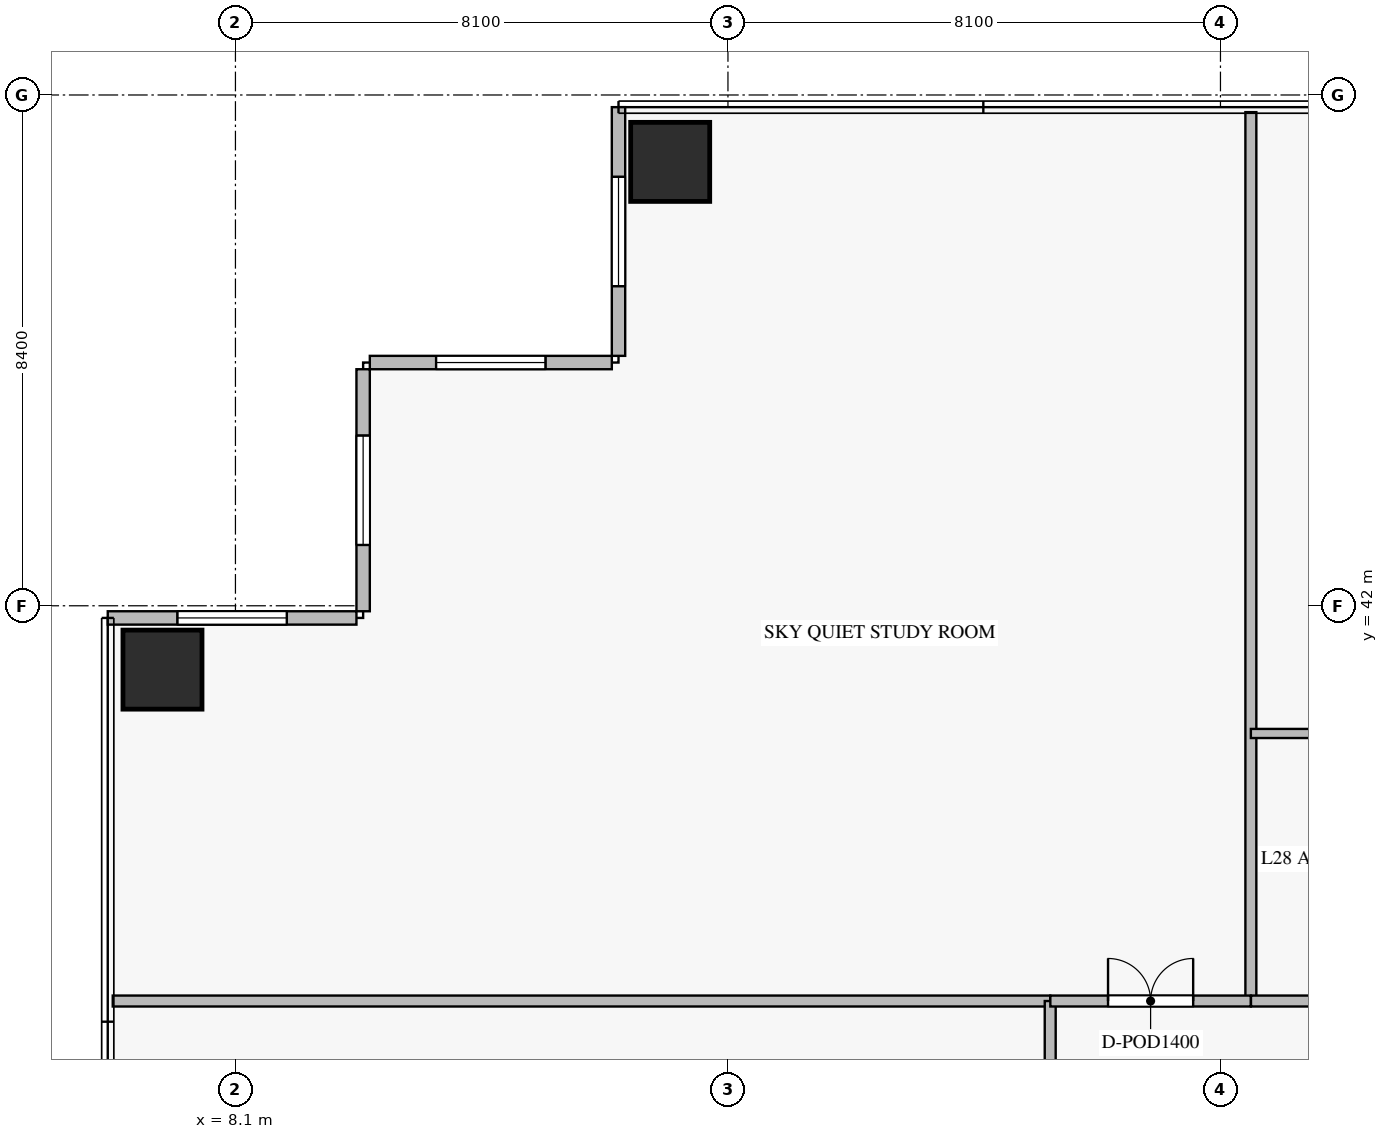
"""IFC4 building model, lengths in metres.
Left out: names, types, materials, properties, quantities, classifications, styles, units other than length and angle.
Written with IfcOpenShell. Run it as: python <this file> out.ifc"""

import sys

from ifc_helpers import new_model, si_unit, direction, frame, frame_2d, origin, origin_2d, place, context, subcontext, project, spatial, rectangle, extrude, source, transform, mapped, element, fill, save


model = new_model("IFC4")
c1 = context("Model", 3, precision=1e-05, world=origin(), true_north=direction((0.0, 1.0)))
c2 = subcontext(c1, "Body", "Model", "MODEL_VIEW")
j1 = project(units=[si_unit("LENGTHUNIT", "METRE"), si_unit("PLANEANGLEUNIT", "RADIAN")], contexts=[c1])
p1 = place(None, origin())
s1 = spatial("IfcSite", under=j1, at=p1, CompositionType="ELEMENT")
p2 = place(p1, origin())
s2 = spatial("IfcBuilding", under=s1, at=p2, CompositionType="ELEMENT")
p3 = place(p2, frame((0.0, 0.0, 115.2)))
s3 = spatial("IfcBuildingStorey", under=s2, at=p3, CompositionType="ELEMENT", Elevation=115.2)
m1 = source(origin(), c2, "Body", "SweptSolid", [
    extrude(rectangle(XDim=1.3, YDim=1.3, at=origin_2d()), origin(), (0.0, 0.0, 1.0), 4.87),
])
for number, where, z_axis, x_axis in (
    (1, (15.25, 49.3, -0.36), (0.0, 0.0, 1.0), (1.0, 0.0, 0.0)),
    (2, (6.9, 40.95, -0.36), (0.0, 0.0, 1.0), (1.0, 0.0, 0.0)),
):
    element("IfcColumn", number, at=place(p3, frame(where, z_axis=z_axis, x_axis=x_axis)), inside=s3, PredefinedType="COLUMN", context=c2, shape_type="MappedRepresentation", body=[
        mapped(m1, transform((0.0, 0.0, 0.0), scale=1.0)),
    ])
p4 = place(p3, frame((14.4, 50.2, 0.0), z_axis=(0.0, 0.0, 1.0), x_axis=(0.0, -1.0, 0.0)))
e3 = element("IfcWall", 3, at=p4, inside=s3, PredefinedType="ELEMENTEDWALL", context=c2, shape_type="SweptSolid", body=[
    extrude(rectangle(XDim=4.09, YDim=0.22, at=frame_2d((2.045, 0.0))), origin(), (0.0, 0.0, 1.0), 4.495),
])
p5 = place(p4, frame((1.145, 0.0, 0.65)))
e4 = element("IfcOpeningElement", 4, at=p5, cuts=e3, PredefinedType="OPENING", context=c2, shape_type="SweptSolid", body=[
    extrude(rectangle(XDim=1.8, YDim=2.1, at=frame_2d((0.9, 1.05))), frame((0.0, 0.12, 0.0), z_axis=(0.0, -1.0, 0.0), x_axis=(1.0, 0.0, 0.0)), (0.0, 0.0, 1.0), 0.24),
])
p6 = place(p3, frame((14.29, 46.0, 0.0), z_axis=(0.0, 0.0, 1.0), x_axis=(-1.0, 0.0, 0.0)))
e5 = element("IfcWall", 5, at=p6, inside=s3, PredefinedType="ELEMENTEDWALL", context=c2, shape_type="SweptSolid", body=[
    extrude(rectangle(XDim=3.98, YDim=0.22, at=frame_2d((1.99, 0.0))), origin(), (0.0, 0.0, 1.0), 4.495),
])
p7 = place(p6, frame((1.09, 0.0, 0.65)))
e6 = element("IfcOpeningElement", 6, at=p7, cuts=e5, PredefinedType="OPENING", context=c2, shape_type="SweptSolid", body=[
    extrude(rectangle(XDim=1.8, YDim=2.1, at=frame_2d((0.9, 1.05))), frame((0.0, 0.12, 0.0), z_axis=(0.0, -1.0, 0.0), x_axis=(1.0, 0.0, 0.0)), (0.0, 0.0, 1.0), 0.24),
])
p8 = place(p3, frame((10.2, 45.89, 0.0), z_axis=(0.0, 0.0, 1.0), x_axis=(0.0, -1.0, 0.0)))
e7 = element("IfcWall", 7, at=p8, inside=s3, PredefinedType="ELEMENTEDWALL", context=c2, shape_type="SweptSolid", body=[
    extrude(rectangle(XDim=3.98, YDim=0.22, at=frame_2d((1.99, 0.0))), origin(), (0.0, 0.0, 1.0), 4.495),
])
p9 = place(p8, frame((1.09, 0.0, 0.65)))
e8 = element("IfcOpeningElement", 8, at=p9, cuts=e7, PredefinedType="OPENING", context=c2, shape_type="SweptSolid", body=[
    extrude(rectangle(XDim=1.8, YDim=2.1, at=frame_2d((0.9, 1.05))), frame((0.0, 0.12, 0.0), z_axis=(0.0, -1.0, 0.0), x_axis=(1.0, 0.0, 0.0)), (0.0, 0.0, 1.0), 0.24),
])
p10 = place(p3, frame((10.09, 41.8, 0.0), z_axis=(0.0, 0.0, 1.0), x_axis=(-1.0, 0.0, 0.0)))
e9 = element("IfcWall", 9, at=p10, inside=s3, PredefinedType="ELEMENTEDWALL", context=c2, shape_type="SweptSolid", body=[
    extrude(rectangle(XDim=4.09, YDim=0.22, at=frame_2d((2.045, 0.0))), origin(), (0.0, 0.0, 1.0), 4.495),
])
p11 = place(p10, frame((1.145, 0.0, 0.65)))
e10 = element("IfcOpeningElement", 10, at=p11, cuts=e9, PredefinedType="OPENING", context=c2, shape_type="SweptSolid", body=[
    extrude(rectangle(XDim=1.8, YDim=2.1, at=frame_2d((0.9, 1.05))), frame((0.0, 0.12, 0.0), z_axis=(0.0, -1.0, 0.0), x_axis=(1.0, 0.0, 0.0)), (0.0, 0.0, 1.0), 0.24),
])
p12 = place(p3, frame((6.082, 35.5, 0.0), z_axis=(0.0, 0.0, 1.0), x_axis=(1.0, 0.0, 0.0)))
e11 = element("IfcWall", 11, at=p12, inside=s3, PredefinedType="PARTITIONING", context=c2, shape_type="SweptSolid", body=[
    extrude(rectangle(XDim=15.418, YDim=0.18, at=frame_2d((7.709, 0.0))), origin(), (0.0, 0.0, 1.0), 4.51),
])
p13 = place(p3, frame((21.5, 14.9, 0.0), z_axis=(0.0, 0.0, 1.0), x_axis=(0.0, 1.0, 0.0)))
e12 = element("IfcWall", 12, at=p13, inside=s3, PredefinedType="PARTITIONING", context=c2, shape_type="SweptSolid", body=[
    extrude(rectangle(XDim=20.6, YDim=0.18, at=frame_2d((10.3, 0.0))), origin(), (0.0, 0.0, 1.0), 4.51),
])
p14 = place(p13, frame((9.55, 0.0, 0.0)))
e13 = element("IfcOpeningElement", 13, at=p14, cuts=e12, PredefinedType="OPENING", context=c2, shape_type="SweptSolid", body=[
    extrude(rectangle(XDim=1.5, YDim=2.25, at=frame_2d((0.75, 1.125))), frame((0.0, 0.1, 0.0), z_axis=(0.0, -1.0, 0.0), x_axis=(1.0, 0.0, 0.0)), (0.0, 0.0, 1.0), 0.2),
])
p15 = place(p3, frame((24.8, 35.5, 0.0), z_axis=(0.0, 0.0, 1.0), x_axis=(0.0, 1.0, 0.0)))
e14 = element("IfcWall", 14, at=p15, inside=s3, PredefinedType="PARTITIONING", context=c2, shape_type="SweptSolid", body=[
    extrude(rectangle(XDim=14.618, YDim=0.18, at=frame_2d((7.309, 0.0))), origin(), (0.0, 0.0, 1.0), 4.51),
])
p16 = place(p3, frame((21.502, 35.5, 0.0), z_axis=(0.0, 0.0, 1.0), x_axis=(1.0, 0.0, 0.0)))
e15 = element("IfcWall", 15, at=p16, inside=s3, PredefinedType="PARTITIONING", context=c2, shape_type="SweptSolid", body=[
    extrude(rectangle(XDim=3.298, YDim=0.18, at=frame_2d((1.649, 0.0))), origin(), (0.0, 0.0, 1.0), 4.51),
])
p17 = place(p16, frame((0.949, 0.0, 0.0)))
e16 = element("IfcOpeningElement", 16, at=p17, cuts=e15, PredefinedType="OPENING", context=c2, shape_type="SweptSolid", body=[
    extrude(rectangle(XDim=1.4, YDim=2.25, at=frame_2d((0.7, 1.125))), frame((0.0, 0.1, 0.0), z_axis=(0.0, -1.0, 0.0), x_axis=(1.0, 0.0, 0.0)), (0.0, 0.0, 1.0), 0.2),
])
p18 = place(p3, frame((24.802, 35.5, 0.0), z_axis=(0.0, 0.0, 1.0), x_axis=(1.0, 0.0, 0.0)))
e17 = element("IfcWall", 17, at=p18, inside=s3, PredefinedType="PARTITIONING", context=c2, shape_type="SweptSolid", body=[
    extrude(rectangle(XDim=4.698, YDim=0.18, at=frame_2d((2.349, 0.0))), origin(), (0.0, 0.0, 1.0), 4.51),
])
p19 = place(p18, frame((1.849, 0.0, 0.0)))
e18 = element("IfcOpeningElement", 18, at=p19, cuts=e17, PredefinedType="OPENING", context=c2, shape_type="SweptSolid", body=[
    extrude(rectangle(XDim=1.0, YDim=2.15, at=frame_2d((0.5, 1.075))), frame((0.0, 0.1, 0.0), z_axis=(0.0, -1.0, 0.0), x_axis=(1.0, 0.0, 0.0)), (0.0, 0.0, 1.0), 0.2),
])
p20 = place(p3, frame((24.8, 39.9, 0.0), z_axis=(0.0, 0.0, 1.0), x_axis=(1.0, 0.0, 0.0)))
e19 = element("IfcWall", 19, at=p20, inside=s3, PredefinedType="PARTITIONING", context=c2, shape_type="SweptSolid", body=[
    extrude(rectangle(XDim=13.7, YDim=0.15, at=frame_2d((6.85, 0.0))), origin(), (0.0, 0.0, 1.0), 4.51),
])
p21 = place(p20, frame((2.304, 0.0, 0.0)))
e20 = element("IfcOpeningElement", 20, at=p21, cuts=e19, PredefinedType="OPENING", context=c2, shape_type="SweptSolid", body=[
    extrude(rectangle(XDim=0.9, YDim=2.1, at=frame_2d((0.45, 1.05))), frame((0.0, 0.085, 0.0), z_axis=(0.0, -1.0, 0.0), x_axis=(1.0, 0.0, 0.0)), (0.0, 0.0, 1.0), 0.17),
])
m2 = source(origin(), c2, "Body", "SweptSolid", [
    extrude(rectangle(XDim=1.8, YDim=2.1, at=frame_2d((0.9, 1.05))), frame((0.0, 0.03, 0.0), z_axis=(0.0, -1.0, 0.0), x_axis=(1.0, 0.0, 0.0)), (0.0, 0.0, 1.0), 0.06),
])
p22 = place(p5, origin())
e21 = element("IfcWindow", 21, at=p22, inside=s3, PartitioningType="SINGLE_PANEL", PredefinedType="WINDOW", context=c2, shape_type="MappedRepresentation", body=[
    mapped(m2, transform((0.0, 0.0, 0.0), scale=1.0)),
])
fill(e4, e21)
p23 = place(p7, origin())
e22 = element("IfcWindow", 22, at=p23, inside=s3, PartitioningType="SINGLE_PANEL", PredefinedType="WINDOW", context=c2, shape_type="MappedRepresentation", body=[
    mapped(m2, transform((0.0, 0.0, 0.0), scale=1.0)),
])
fill(e6, e22)
p24 = place(p9, origin())
e23 = element("IfcWindow", 23, at=p24, inside=s3, PartitioningType="SINGLE_PANEL", PredefinedType="WINDOW", context=c2, shape_type="MappedRepresentation", body=[
    mapped(m2, transform((0.0, 0.0, 0.0), scale=1.0)),
])
fill(e8, e23)
p25 = place(p11, origin())
e24 = element("IfcWindow", 24, at=p25, inside=s3, PartitioningType="SINGLE_PANEL", PredefinedType="WINDOW", context=c2, shape_type="MappedRepresentation", body=[
    mapped(m2, transform((0.0, 0.0, 0.0), scale=1.0)),
])
fill(e10, e24)
m3 = source(origin(), c2, "Body", "SweptSolid", [
    extrude(rectangle(XDim=1.4, YDim=2.25, at=frame_2d((0.7, 1.125))), frame((0.0, 0.025, 0.0), z_axis=(0.0, -1.0, 0.0), x_axis=(1.0, 0.0, 0.0)), (0.0, 0.0, 1.0), 0.05),
])
p26 = place(p17, origin())
e25 = element("IfcDoor", 25, at=p26, inside=s3, OperationType="DOUBLE_DOOR_SINGLE_SWING", PredefinedType="DOOR", context=c2, shape_type="MappedRepresentation", body=[
    mapped(m3, transform((0.0, 0.0, 0.0), scale=1.0)),
])
fill(e16, e25)
save(model, sys.argv[1])
